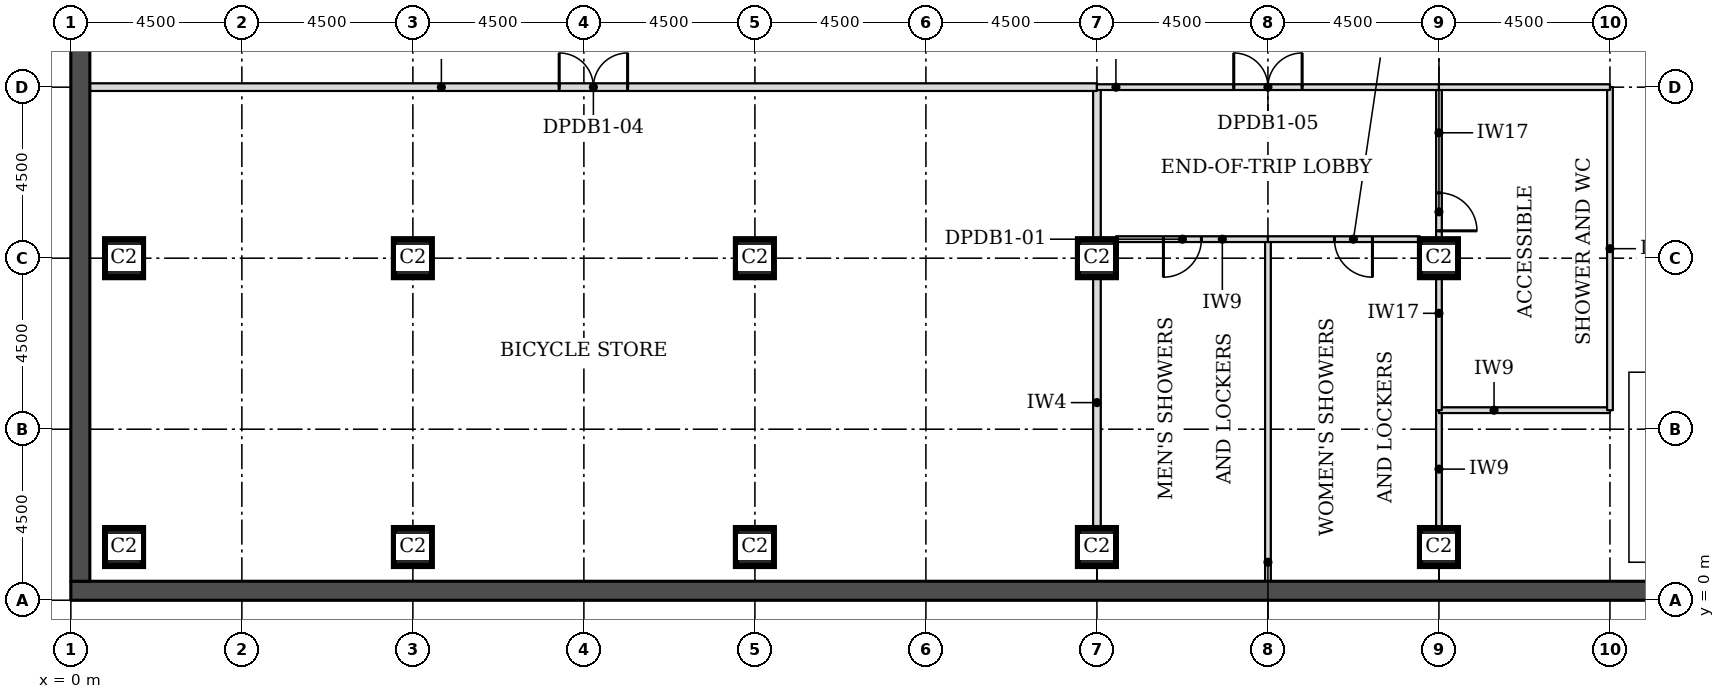
"""IFC4 building model, lengths in metres.
Left out: names, types, materials, properties, quantities, classifications, styles, units other than length and angle.
Written with IfcOpenShell. Run it as: python <this file> out.ifc"""

import sys

from ifc_helpers import new_model, si_unit, direction, frame, frame_2d, origin, origin_2d, place, context, subcontext, project, spatial, rectangle, extrude, element, fill, save


model = new_model("IFC4")
c1 = context("Model", 3, precision=1e-05, world=origin(), true_north=direction((0.0, 1.0)))
c2 = subcontext(c1, "Body", "Model", "MODEL_VIEW")
j1 = project(units=[si_unit("LENGTHUNIT", "METRE"), si_unit("PLANEANGLEUNIT", "RADIAN")], contexts=[c1])
p1 = place(None, origin())
s1 = spatial("IfcSite", under=j1, at=p1, CompositionType="ELEMENT")
p2 = place(p1, origin())
s2 = spatial("IfcBuilding", under=s1, at=p2, CompositionType="ELEMENT")
p3 = place(p2, frame((0.0, 0.0, -4.5)))
s3 = spatial("IfcBuildingStorey", under=s2, at=p3, CompositionType="ELEMENT", Elevation=-4.5)
p4 = place(p3, frame((0.0, 0.25, 0.0), z_axis=(0.0, 0.0, 1.0), x_axis=(1.0, 0.0, 0.0)))
e1 = element("IfcWall", 1, at=p4, inside=s3, PredefinedType="SOLIDWALL", context=c2, shape_type="SweptSolid", body=[
    extrude(rectangle(XDim=99.0, YDim=0.5, at=frame_2d((49.5, 0.0))), origin(), (0.0, 0.0, 1.0), 4.1),
])
p5 = place(p3, frame((0.25, 0.5, 0.0), z_axis=(0.0, 0.0, 1.0), x_axis=(0.0, 1.0, 0.0)))
e2 = element("IfcWall", 2, at=p5, inside=s3, PredefinedType="SOLIDWALL", context=c2, shape_type="SweptSolid", body=[
    extrude(rectangle(XDim=93.5, YDim=0.5, at=frame_2d((46.75, 0.0))), origin(), (0.0, 0.0, 1.0), 4.1),
])
for number, where, z_axis, x_axis in (
    (3, (9.0, 9.0, 0.0), (0.0, 0.0, 1.0), (1.0, 0.0, 0.0)),
    (4, (18.0, 9.0, 0.0), (0.0, 0.0, 1.0), (1.0, 0.0, 0.0)),
    (5, (27.0, 9.0, 0.0), (0.0, 0.0, 1.0), (1.0, 0.0, 0.0)),
    (6, (36.0, 9.0, 0.0), (0.0, 0.0, 1.0), (1.0, 0.0, 0.0)),
    (7, (1.4, 1.4, 0.0), (0.0, 0.0, 1.0), (1.0, 0.0, 0.0)),
    (8, (9.0, 1.4, 0.0), (0.0, 0.0, 1.0), (1.0, 0.0, 0.0)),
    (9, (18.0, 1.4, 0.0), (0.0, 0.0, 1.0), (1.0, 0.0, 0.0)),
    (10, (27.0, 1.4, 0.0), (0.0, 0.0, 1.0), (1.0, 0.0, 0.0)),
    (11, (36.0, 1.4, 0.0), (0.0, 0.0, 1.0), (1.0, 0.0, 0.0)),
    (12, (1.4, 9.0, 0.0), (0.0, 0.0, 1.0), (1.0, 0.0, 0.0)),
):
    element("IfcColumn", number, at=place(p3, frame(where, z_axis=z_axis, x_axis=x_axis)), inside=s3, PredefinedType="COLUMN", context=c2, shape_type="SweptSolid", body=[
        extrude(rectangle(XDim=1.0, YDim=1.0, at=origin_2d()), origin(), (0.0, 0.0, 1.0), 4.5),
    ])
p6 = place(p3, frame((27.0, 1.9, 0.0), z_axis=(0.0, 0.0, 1.0), x_axis=(0.0, 1.0, 0.0)))
e13 = element("IfcWall", 13, at=p6, inside=s3, PredefinedType="PARTITIONING", context=c2, shape_type="SweptSolid", body=[
    extrude(rectangle(XDim=6.6, YDim=0.2, at=frame_2d((3.3, 0.0))), origin(), (0.0, 0.0, 1.0), 4.1),
])
p7 = place(p3, frame((31.5, 0.5, 0.0), z_axis=(0.0, 0.0, 1.0), x_axis=(0.0, 1.0, 0.0)))
e14 = element("IfcWall", 14, at=p7, inside=s3, PredefinedType="PARTITIONING", context=c2, shape_type="SweptSolid", body=[
    extrude(rectangle(XDim=9.0, YDim=0.15, at=frame_2d((4.5, 0.0))), origin(), (0.0, 0.0, 1.0), 4.1),
])
p8 = place(p3, frame((36.0, 1.9, 0.0), z_axis=(0.0, 0.0, 1.0), x_axis=(0.0, 1.0, 0.0)))
e15 = element("IfcWall", 15, at=p8, inside=s3, PredefinedType="PARTITIONING", context=c2, shape_type="SweptSolid", body=[
    extrude(rectangle(XDim=3.1, YDim=0.15, at=frame_2d((1.55, 0.0))), origin(), (0.0, 0.0, 1.0), 4.1),
])
p9 = place(p3, frame((36.0, 5.0, 0.0), z_axis=(0.0, 0.0, 1.0), x_axis=(1.0, 0.0, 0.0)))
e16 = element("IfcWall", 16, at=p9, inside=s3, PredefinedType="PARTITIONING", context=c2, shape_type="SweptSolid", body=[
    extrude(rectangle(XDim=4.5, YDim=0.15, at=frame_2d((2.25, 0.0))), origin(), (0.0, 0.0, 1.0), 4.1),
])
p10 = place(p3, frame((36.0, 5.0, 0.0), z_axis=(0.0, 0.0, 1.0), x_axis=(0.0, 1.0, 0.0)))
e17 = element("IfcWall", 17, at=p10, inside=s3, PredefinedType="PARTITIONING", context=c2, shape_type="SweptSolid", body=[
    extrude(rectangle(XDim=3.5, YDim=0.15, at=frame_2d((1.75, 0.0))), origin(), (0.0, 0.0, 1.0), 4.1),
])
p11 = place(p3, frame((40.5, 5.0, 0.0), z_axis=(0.0, 0.0, 1.0), x_axis=(0.0, 1.0, 0.0)))
e18 = element("IfcWall", 18, at=p11, inside=s3, PredefinedType="PARTITIONING", context=c2, shape_type="SweptSolid", body=[
    extrude(rectangle(XDim=8.5, YDim=0.15, at=frame_2d((4.25, 0.0))), origin(), (0.0, 0.0, 1.0), 4.1),
])
p12 = place(p3, frame((27.5, 9.5, 0.0), z_axis=(0.0, 0.0, 1.0), x_axis=(1.0, 0.0, 0.0)))
e19 = element("IfcWall", 19, at=p12, inside=s3, PredefinedType="PARTITIONING", context=c2, shape_type="SweptSolid", body=[
    extrude(rectangle(XDim=4.0, YDim=0.15, at=frame_2d((2.0, 0.0))), origin(), (0.0, 0.0, 1.0), 4.1),
])
p13 = place(p12, frame((1.25, 0.0, 0.0)))
e20 = element("IfcOpeningElement", 20, at=p13, cuts=e19, PredefinedType="OPENING", context=c2, shape_type="SweptSolid", body=[
    extrude(rectangle(XDim=1.0, YDim=2.1, at=frame_2d((0.5, 1.05))), frame((0.0, 0.085, 0.0), z_axis=(0.0, -1.0, 0.0), x_axis=(1.0, 0.0, 0.0)), (0.0, 0.0, 1.0), 0.17),
])
p14 = place(p3, frame((27.0, 9.5, 0.0), z_axis=(0.0, 0.0, 1.0), x_axis=(0.0, 1.0, 0.0)))
e21 = element("IfcWall", 21, at=p14, inside=s3, PredefinedType="PARTITIONING", context=c2, shape_type="SweptSolid", body=[
    extrude(rectangle(XDim=4.0, YDim=0.2, at=frame_2d((2.0, 0.0))), origin(), (0.0, 0.0, 1.0), 4.1),
])
p15 = place(p3, frame((31.5, 9.5, 0.0), z_axis=(0.0, 0.0, 1.0), x_axis=(1.0, 0.0, 0.0)))
e22 = element("IfcWall", 22, at=p15, inside=s3, PredefinedType="PARTITIONING", context=c2, shape_type="SweptSolid", body=[
    extrude(rectangle(XDim=4.0, YDim=0.15, at=frame_2d((2.0, 0.0))), origin(), (0.0, 0.0, 1.0), 4.1),
])
p16 = place(p15, frame((1.75, 0.0, 0.0)))
e23 = element("IfcOpeningElement", 23, at=p16, cuts=e22, PredefinedType="OPENING", context=c2, shape_type="SweptSolid", body=[
    extrude(rectangle(XDim=1.0, YDim=2.1, at=frame_2d((0.5, 1.05))), frame((0.0, 0.085, 0.0), z_axis=(0.0, -1.0, 0.0), x_axis=(1.0, 0.0, 0.0)), (0.0, 0.0, 1.0), 0.17),
])
p17 = place(p3, frame((36.0, 9.5, 0.0), z_axis=(0.0, 0.0, 1.0), x_axis=(0.0, 1.0, 0.0)))
e24 = element("IfcWall", 24, at=p17, inside=s3, PredefinedType="PARTITIONING", context=c2, shape_type="SweptSolid", body=[
    extrude(rectangle(XDim=4.0, YDim=0.15, at=frame_2d((2.0, 0.0))), origin(), (0.0, 0.0, 1.0), 4.1),
])
p18 = place(p17, frame((0.22, 0.0, 0.0)))
e25 = element("IfcOpeningElement", 25, at=p18, cuts=e24, PredefinedType="OPENING", context=c2, shape_type="SweptSolid", body=[
    extrude(rectangle(XDim=1.0, YDim=2.1, at=frame_2d((0.5, 1.05))), frame((0.0, 0.085, 0.0), z_axis=(0.0, -1.0, 0.0), x_axis=(1.0, 0.0, 0.0)), (0.0, 0.0, 1.0), 0.17),
])
p19 = place(p3, frame((0.5, 13.5, 0.0), z_axis=(0.0, 0.0, 1.0), x_axis=(1.0, 0.0, 0.0)))
e26 = element("IfcWall", 26, at=p19, inside=s3, PredefinedType="PARTITIONING", context=c2, shape_type="SweptSolid", body=[
    extrude(rectangle(XDim=26.5, YDim=0.2, at=frame_2d((13.25, 0.0))), origin(), (0.0, 0.0, 1.0), 4.1),
])
p20 = place(p19, frame((12.35, 0.0, 0.0)))
e27 = element("IfcOpeningElement", 27, at=p20, cuts=e26, PredefinedType="OPENING", context=c2, shape_type="SweptSolid", body=[
    extrude(rectangle(XDim=1.8, YDim=2.1, at=frame_2d((0.9, 1.05))), frame((0.0, 0.11, 0.0), z_axis=(0.0, -1.0, 0.0), x_axis=(1.0, 0.0, 0.0)), (0.0, 0.0, 1.0), 0.22),
])
p21 = place(p3, frame((27.0, 13.5, 0.0), z_axis=(0.0, 0.0, 1.0), x_axis=(1.0, 0.0, 0.0)))
e28 = element("IfcWall", 28, at=p21, inside=s3, PredefinedType="PARTITIONING", context=c2, shape_type="SweptSolid", body=[
    extrude(rectangle(XDim=9.0, YDim=0.15, at=frame_2d((4.5, 0.0))), origin(), (0.0, 0.0, 1.0), 4.1),
])
p22 = place(p21, frame((3.6, 0.0, 0.0)))
e29 = element("IfcOpeningElement", 29, at=p22, cuts=e28, PredefinedType="OPENING", context=c2, shape_type="SweptSolid", body=[
    extrude(rectangle(XDim=1.8, YDim=2.1, at=frame_2d((0.9, 1.05))), frame((0.0, 0.085, 0.0), z_axis=(0.0, -1.0, 0.0), x_axis=(1.0, 0.0, 0.0)), (0.0, 0.0, 1.0), 0.17),
])
p23 = place(p3, frame((36.0, 13.5, 0.0), z_axis=(0.0, 0.0, 1.0), x_axis=(1.0, 0.0, 0.0)))
e30 = element("IfcWall", 30, at=p23, inside=s3, PredefinedType="PARTITIONING", context=c2, shape_type="SweptSolid", body=[
    extrude(rectangle(XDim=4.5, YDim=0.15, at=frame_2d((2.25, 0.0))), origin(), (0.0, 0.0, 1.0), 4.1),
])
p24 = place(p20, origin())
e31 = element("IfcDoor", 31, at=p24, inside=s3, OperationType="DOUBLE_DOOR_SINGLE_SWING", PredefinedType="DOOR", context=c2, shape_type="SweptSolid", body=[
    extrude(rectangle(XDim=1.8, YDim=2.1, at=frame_2d((0.9, 1.05))), frame((0.0, 0.025, 0.0), z_axis=(0.0, -1.0, 0.0), x_axis=(1.0, 0.0, 0.0)), (0.0, 0.0, 1.0), 0.05),
])
fill(e27, e31)
p25 = place(p22, origin())
e32 = element("IfcDoor", 32, at=p25, inside=s3, OperationType="DOUBLE_DOOR_SINGLE_SWING", PredefinedType="DOOR", context=c2, shape_type="SweptSolid", body=[
    extrude(rectangle(XDim=1.8, YDim=2.1, at=frame_2d((0.9, 1.05))), frame((0.0, 0.025, 0.0), z_axis=(0.0, -1.0, 0.0), x_axis=(1.0, 0.0, 0.0)), (0.0, 0.0, 1.0), 0.05),
])
fill(e29, e32)
p26 = place(p13, frame((1.0, 0.0, 0.0), z_axis=(0.0, 0.0, 1.0), x_axis=(-1.0, 0.0, 0.0)))
e33 = element("IfcDoor", 33, at=p26, inside=s3, OperationType="SINGLE_SWING_RIGHT", PredefinedType="DOOR", context=c2, shape_type="SweptSolid", body=[
    extrude(rectangle(XDim=1.0, YDim=2.1, at=frame_2d((0.5, 1.05))), frame((0.0, 0.025, 0.0), z_axis=(0.0, -1.0, 0.0), x_axis=(1.0, 0.0, 0.0)), (0.0, 0.0, 1.0), 0.05),
])
fill(e20, e33)
p27 = place(p16, frame((1.0, 0.0, 0.0), z_axis=(0.0, 0.0, 1.0), x_axis=(-1.0, 0.0, 0.0)))
e34 = element("IfcDoor", 34, at=p27, inside=s3, OperationType="SINGLE_SWING_LEFT", PredefinedType="DOOR", context=c2, shape_type="SweptSolid", body=[
    extrude(rectangle(XDim=1.0, YDim=2.1, at=frame_2d((0.5, 1.05))), frame((0.0, 0.025, 0.0), z_axis=(0.0, -1.0, 0.0), x_axis=(1.0, 0.0, 0.0)), (0.0, 0.0, 1.0), 0.05),
])
fill(e23, e34)
p28 = place(p18, frame((1.0, 0.0, 0.0), z_axis=(0.0, 0.0, 1.0), x_axis=(-1.0, 0.0, 0.0)))
e35 = element("IfcDoor", 35, at=p28, inside=s3, OperationType="SINGLE_SWING_RIGHT", PredefinedType="DOOR", context=c2, shape_type="SweptSolid", body=[
    extrude(rectangle(XDim=1.0, YDim=2.1, at=frame_2d((0.5, 1.05))), frame((0.0, 0.025, 0.0), z_axis=(0.0, -1.0, 0.0), x_axis=(1.0, 0.0, 0.0)), (0.0, 0.0, 1.0), 0.05),
])
fill(e25, e35)
save(model, sys.argv[1])
